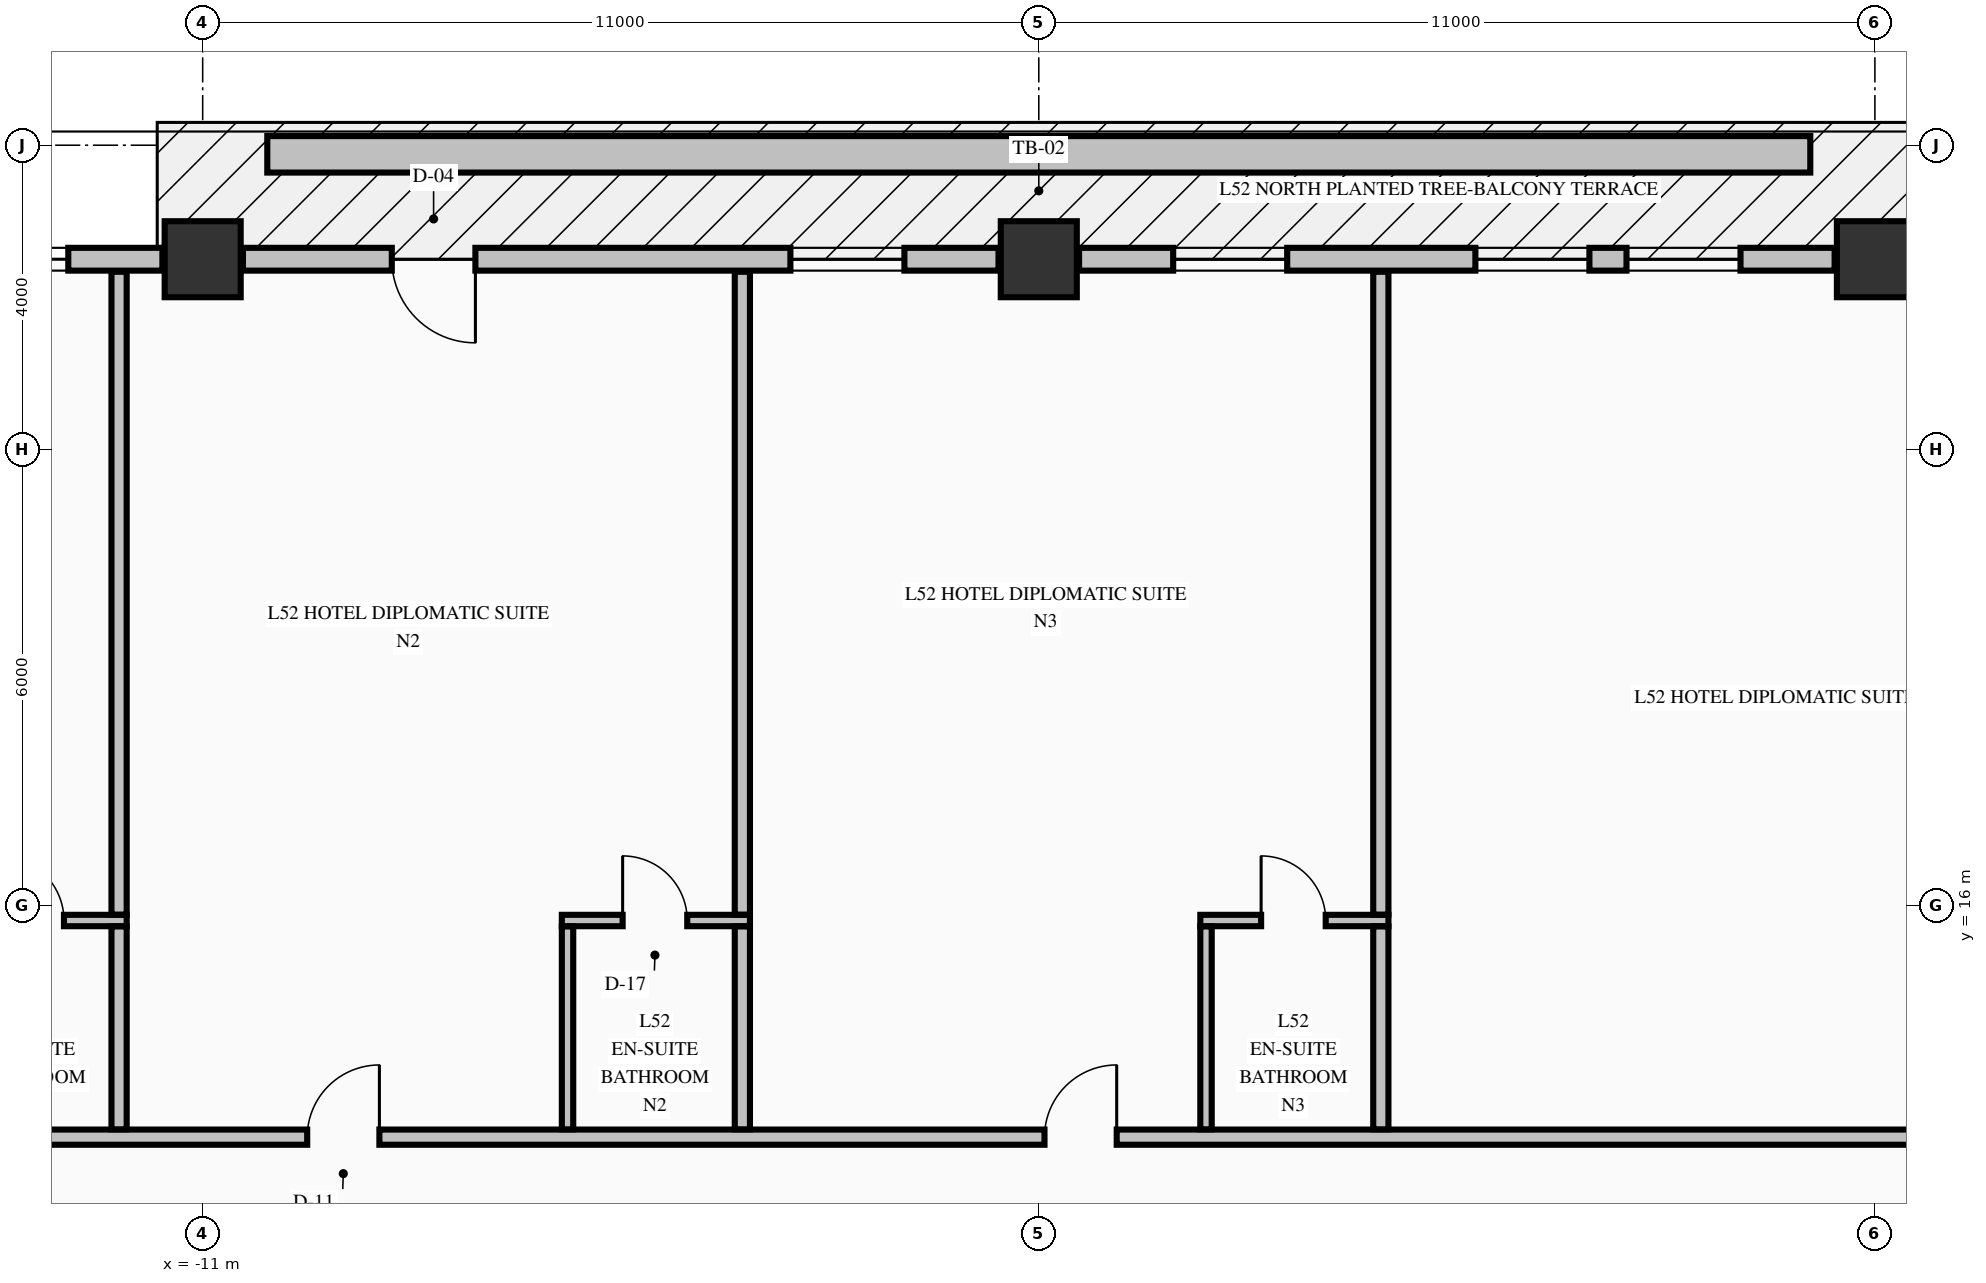
"""IFC4 building model, lengths in metres.
Left out: names, types, materials, properties, quantities, classifications, styles, units other than length and angle.
Written with IfcOpenShell. Run it as: python <this file> out.ifc"""

import sys

from ifc_helpers import new_model, si_unit, direction, frame, frame_2d, origin, origin_2d, place, context, subcontext, project, spatial, rectangle, extrude, element, fill, save


model = new_model("IFC4")
c1 = context("Model", 3, precision=1e-05, world=origin(), true_north=direction((0.0, 1.0)))
c2 = subcontext(c1, "Body", "Model", "MODEL_VIEW")
j1 = project(units=[si_unit("LENGTHUNIT", "METRE"), si_unit("PLANEANGLEUNIT", "RADIAN")], contexts=[c1])
p1 = place(None, origin())
s1 = spatial("IfcSite", under=j1, at=p1, CompositionType="ELEMENT")
p2 = place(p1, origin())
s2 = spatial("IfcBuilding", under=s1, at=p2, CompositionType="ELEMENT")
p3 = place(p2, frame((0.0, 0.0, 201.66)))
s3 = spatial("IfcBuildingStorey", under=s2, at=p3, CompositionType="ELEMENT", Elevation=201.66)
for number, where, z_axis, x_axis in (
    (1, (-11.0, 24.5, -0.25), (0.0, 0.0, 1.0), (1.0, 0.0, 0.0)),
    (2, (0.0, 24.5, -0.25), (0.0, 0.0, 1.0), (1.0, 0.0, 0.0)),
    (3, (11.0, 24.5, -0.25), (0.0, 0.0, 1.0), (1.0, 0.0, 0.0)),
):
    element("IfcColumn", number, at=place(p3, frame(where, z_axis=z_axis, x_axis=x_axis)), inside=s3, PredefinedType="COLUMN", context=c2, shape_type="SweptSolid", body=[
        extrude(rectangle(XDim=1.0, YDim=1.0, at=origin_2d()), origin(), (0.0, 0.0, 1.0), 3.4),
    ])
p4 = place(p3, frame((-11.53, 24.5, 0.0), z_axis=(0.0, 0.0, 1.0), x_axis=(-1.0, 0.0, 0.0)))
e4 = element("IfcWall", 4, at=p4, inside=s3, PredefinedType="STANDARD", context=c2, shape_type="SweptSolid", body=[
    extrude(rectangle(XDim=9.94, YDim=0.3, at=frame_2d((4.97, 0.0))), origin(), (0.0, 0.0, 1.0), 2.542),
])
p5 = place(p4, frame((1.238, 0.0, 0.72)))
e5 = element("IfcOpeningElement", 5, at=p5, cuts=e4, PredefinedType="OPENING", context=c2, shape_type="SweptSolid", body=[
    extrude(rectangle(XDim=1.5, YDim=1.6, at=frame_2d((0.75, 0.8))), frame((0.0, 0.16, 0.0), z_axis=(0.0, -1.0, 0.0), x_axis=(1.0, 0.0, 0.0)), (0.0, 0.0, 1.0), 0.32),
])
p6 = place(p4, frame((3.226, 0.0, 0.72)))
e6 = element("IfcOpeningElement", 6, at=p6, cuts=e4, PredefinedType="OPENING", context=c2, shape_type="SweptSolid", body=[
    extrude(rectangle(XDim=1.5, YDim=1.6, at=frame_2d((0.75, 0.8))), frame((0.0, 0.16, 0.0), z_axis=(0.0, -1.0, 0.0), x_axis=(1.0, 0.0, 0.0)), (0.0, 0.0, 1.0), 0.32),
])
p7 = place(p4, frame((5.214, 0.0, 0.72)))
e7 = element("IfcOpeningElement", 7, at=p7, cuts=e4, PredefinedType="OPENING", context=c2, shape_type="SweptSolid", body=[
    extrude(rectangle(XDim=1.5, YDim=1.6, at=frame_2d((0.75, 0.8))), frame((0.0, 0.16, 0.0), z_axis=(0.0, -1.0, 0.0), x_axis=(1.0, 0.0, 0.0)), (0.0, 0.0, 1.0), 0.32),
])
p8 = place(p3, frame((-0.53, 24.5, 0.0), z_axis=(0.0, 0.0, 1.0), x_axis=(-1.0, 0.0, 0.0)))
e8 = element("IfcWall", 8, at=p8, inside=s3, PredefinedType="STANDARD", context=c2, shape_type="SweptSolid", body=[
    extrude(rectangle(XDim=9.94, YDim=0.3, at=frame_2d((4.97, 0.0))), origin(), (0.0, 0.0, 1.0), 2.542),
])
p9 = place(p8, frame((6.882, 0.0, 0.0)))
e9 = element("IfcOpeningElement", 9, at=p9, cuts=e8, PredefinedType="OPENING", context=c2, shape_type="SweptSolid", body=[
    extrude(rectangle(XDim=1.1, YDim=2.15, at=frame_2d((0.55, 1.075))), frame((0.0, 0.16, 0.0), z_axis=(0.0, -1.0, 0.0), x_axis=(1.0, 0.0, 0.0)), (0.0, 0.0, 1.0), 0.32),
])
p10 = place(p8, frame((1.238, 0.0, 0.72)))
e10 = element("IfcOpeningElement", 10, at=p10, cuts=e8, PredefinedType="OPENING", context=c2, shape_type="SweptSolid", body=[
    extrude(rectangle(XDim=1.5, YDim=1.6, at=frame_2d((0.75, 0.8))), frame((0.0, 0.16, 0.0), z_axis=(0.0, -1.0, 0.0), x_axis=(1.0, 0.0, 0.0)), (0.0, 0.0, 1.0), 0.32),
])
p11 = place(p3, frame((10.47, 24.5, 0.0), z_axis=(0.0, 0.0, 1.0), x_axis=(-1.0, 0.0, 0.0)))
e11 = element("IfcWall", 11, at=p11, inside=s3, PredefinedType="STANDARD", context=c2, shape_type="SweptSolid", body=[
    extrude(rectangle(XDim=9.94, YDim=0.3, at=frame_2d((4.97, 0.0))), origin(), (0.0, 0.0, 1.0), 2.542),
])
p12 = place(p11, frame((1.238, 0.0, 0.72)))
e12 = element("IfcOpeningElement", 12, at=p12, cuts=e11, PredefinedType="OPENING", context=c2, shape_type="SweptSolid", body=[
    extrude(rectangle(XDim=1.5, YDim=1.6, at=frame_2d((0.75, 0.8))), frame((0.0, 0.16, 0.0), z_axis=(0.0, -1.0, 0.0), x_axis=(1.0, 0.0, 0.0)), (0.0, 0.0, 1.0), 0.32),
])
p13 = place(p11, frame((3.226, 0.0, 0.72)))
e13 = element("IfcOpeningElement", 13, at=p13, cuts=e11, PredefinedType="OPENING", context=c2, shape_type="SweptSolid", body=[
    extrude(rectangle(XDim=1.5, YDim=1.6, at=frame_2d((0.75, 0.8))), frame((0.0, 0.16, 0.0), z_axis=(0.0, -1.0, 0.0), x_axis=(1.0, 0.0, 0.0)), (0.0, 0.0, 1.0), 0.32),
])
p14 = place(p11, frame((7.202, 0.0, 0.72)))
e14 = element("IfcOpeningElement", 14, at=p14, cuts=e11, PredefinedType="OPENING", context=c2, shape_type="SweptSolid", body=[
    extrude(rectangle(XDim=1.5, YDim=1.6, at=frame_2d((0.75, 0.8))), frame((0.0, 0.16, 0.0), z_axis=(0.0, -1.0, 0.0), x_axis=(1.0, 0.0, 0.0)), (0.0, 0.0, 1.0), 0.32),
])
p15 = place(p3, frame((-22.1, 12.95, 0.0), z_axis=(0.0, 0.0, 1.0), x_axis=(1.0, 0.0, 0.0)))
e15 = element("IfcWall", 15, at=p15, inside=s3, PredefinedType="PARTITIONING", context=c2, shape_type="SweptSolid", body=[
    extrude(rectangle(XDim=39.2, YDim=0.2, at=frame_2d((19.6, 0.0))), origin(), (0.0, 0.0, 1.0), 3.15),
])
p16 = place(p15, frame((4.525, 0.0, 0.0)))
e16 = element("IfcOpeningElement", 16, at=p16, cuts=e15, PredefinedType="OPENING", context=c2, shape_type="SweptSolid", body=[
    extrude(rectangle(XDim=0.95, YDim=2.15, at=frame_2d((0.475, 1.075))), frame((0.0, 0.11, 0.0), z_axis=(0.0, -1.0, 0.0), x_axis=(1.0, 0.0, 0.0)), (0.0, 0.0, 1.0), 0.22),
])
p17 = place(p15, frame((12.475, 0.0, 0.0)))
e17 = element("IfcOpeningElement", 17, at=p17, cuts=e15, PredefinedType="OPENING", context=c2, shape_type="SweptSolid", body=[
    extrude(rectangle(XDim=0.95, YDim=2.15, at=frame_2d((0.475, 1.075))), frame((0.0, 0.11, 0.0), z_axis=(0.0, -1.0, 0.0), x_axis=(1.0, 0.0, 0.0)), (0.0, 0.0, 1.0), 0.22),
])
p18 = place(p15, frame((22.175, 0.0, 0.0)))
e18 = element("IfcOpeningElement", 18, at=p18, cuts=e15, PredefinedType="OPENING", context=c2, shape_type="SweptSolid", body=[
    extrude(rectangle(XDim=0.95, YDim=2.15, at=frame_2d((0.475, 1.075))), frame((0.0, 0.11, 0.0), z_axis=(0.0, -1.0, 0.0), x_axis=(1.0, 0.0, 0.0)), (0.0, 0.0, 1.0), 0.22),
])
p19 = place(p15, frame((34.675, 0.0, 0.0)))
e19 = element("IfcOpeningElement", 19, at=p19, cuts=e15, PredefinedType="OPENING", context=c2, shape_type="SweptSolid", body=[
    extrude(rectangle(XDim=0.95, YDim=2.15, at=frame_2d((0.475, 1.075))), frame((0.0, 0.11, 0.0), z_axis=(0.0, -1.0, 0.0), x_axis=(1.0, 0.0, 0.0)), (0.0, 0.0, 1.0), 0.22),
])
p20 = place(p3, frame((-14.475, 15.8, 0.0), z_axis=(0.0, 0.0, 1.0), x_axis=(1.0, 0.0, 0.0)))
e20 = element("IfcWall", 20, at=p20, inside=s3, PredefinedType="PARTITIONING", context=c2, shape_type="SweptSolid", body=[
    extrude(rectangle(XDim=2.475, YDim=0.15, at=frame_2d((1.238, 0.0))), origin(), (0.0, 0.0, 1.0), 3.15),
])
p21 = place(p20, frame((0.8, 0.0, 0.0)))
e21 = element("IfcOpeningElement", 21, at=p21, cuts=e20, PredefinedType="OPENING", context=c2, shape_type="SweptSolid", body=[
    extrude(rectangle(XDim=0.85, YDim=2.1, at=frame_2d((0.425, 1.05))), frame((0.0, 0.085, 0.0), z_axis=(0.0, -1.0, 0.0), x_axis=(1.0, 0.0, 0.0)), (0.0, 0.0, 1.0), 0.17),
])
p22 = place(p3, frame((-6.275, 15.8, 0.0), z_axis=(0.0, 0.0, 1.0), x_axis=(1.0, 0.0, 0.0)))
e22 = element("IfcWall", 22, at=p22, inside=s3, PredefinedType="PARTITIONING", context=c2, shape_type="SweptSolid", body=[
    extrude(rectangle(XDim=2.475, YDim=0.15, at=frame_2d((1.237, 0.0))), origin(), (0.0, 0.0, 1.0), 3.15),
])
p23 = place(p22, frame((0.8, 0.0, 0.0)))
e23 = element("IfcOpeningElement", 23, at=p23, cuts=e22, PredefinedType="OPENING", context=c2, shape_type="SweptSolid", body=[
    extrude(rectangle(XDim=0.85, YDim=2.1, at=frame_2d((0.425, 1.05))), frame((0.0, 0.085, 0.0), z_axis=(0.0, -1.0, 0.0), x_axis=(1.0, 0.0, 0.0)), (0.0, 0.0, 1.0), 0.17),
])
p24 = place(p3, frame((2.125, 15.8, 0.0), z_axis=(0.0, 0.0, 1.0), x_axis=(1.0, 0.0, 0.0)))
e24 = element("IfcWall", 24, at=p24, inside=s3, PredefinedType="PARTITIONING", context=c2, shape_type="SweptSolid", body=[
    extrude(rectangle(XDim=2.475, YDim=0.15, at=frame_2d((1.238, 0.0))), origin(), (0.0, 0.0, 1.0), 3.15),
])
p25 = place(p24, frame((0.8, 0.0, 0.0)))
e25 = element("IfcOpeningElement", 25, at=p25, cuts=e24, PredefinedType="OPENING", context=c2, shape_type="SweptSolid", body=[
    extrude(rectangle(XDim=0.85, YDim=2.1, at=frame_2d((0.425, 1.05))), frame((0.0, 0.085, 0.0), z_axis=(0.0, -1.0, 0.0), x_axis=(1.0, 0.0, 0.0)), (0.0, 0.0, 1.0), 0.17),
])
p26 = place(p3, frame((-12.1, 13.053, 0.0), z_axis=(0.0, 0.0, 1.0), x_axis=(0.0, 1.0, 0.0)))
e26 = element("IfcWall", 26, at=p26, inside=s3, PredefinedType="PARTITIONING", context=c2, shape_type="SweptSolid", body=[
    extrude(rectangle(XDim=2.669, YDim=0.2, at=frame_2d((1.334, 0.0))), origin(), (0.0, 0.0, 1.0), 3.15),
])
p27 = place(p3, frame((-12.1, 15.878, 0.0), z_axis=(0.0, 0.0, 1.0), x_axis=(0.0, 1.0, 0.0)))
e27 = element("IfcWall", 27, at=p27, inside=s3, PredefinedType="PARTITIONING", context=c2, shape_type="SweptSolid", body=[
    extrude(rectangle(XDim=8.457, YDim=0.2, at=frame_2d((4.229, 0.0))), origin(), (0.0, 0.0, 1.0), 3.15),
])
p28 = place(p3, frame((-6.2, 13.053, 0.0), z_axis=(0.0, 0.0, 1.0), x_axis=(0.0, 1.0, 0.0)))
e28 = element("IfcWall", 28, at=p28, inside=s3, PredefinedType="PARTITIONING", context=c2, shape_type="SweptSolid", body=[
    extrude(rectangle(XDim=2.669, YDim=0.15, at=frame_2d((1.334, 0.0))), origin(), (0.0, 0.0, 1.0), 3.15),
])
p29 = place(p3, frame((-3.9, 13.053, 0.0), z_axis=(0.0, 0.0, 1.0), x_axis=(0.0, 1.0, 0.0)))
e29 = element("IfcWall", 29, at=p29, inside=s3, PredefinedType="PARTITIONING", context=c2, shape_type="SweptSolid", body=[
    extrude(rectangle(XDim=2.669, YDim=0.2, at=frame_2d((1.334, 0.0))), origin(), (0.0, 0.0, 1.0), 3.15),
])
p30 = place(p3, frame((-3.9, 15.878, 0.0), z_axis=(0.0, 0.0, 1.0), x_axis=(0.0, 1.0, 0.0)))
e30 = element("IfcWall", 30, at=p30, inside=s3, PredefinedType="PARTITIONING", context=c2, shape_type="SweptSolid", body=[
    extrude(rectangle(XDim=8.457, YDim=0.2, at=frame_2d((4.229, 0.0))), origin(), (0.0, 0.0, 1.0), 3.15),
])
p31 = place(p3, frame((2.2, 13.053, 0.0), z_axis=(0.0, 0.0, 1.0), x_axis=(0.0, 1.0, 0.0)))
e31 = element("IfcWall", 31, at=p31, inside=s3, PredefinedType="PARTITIONING", context=c2, shape_type="SweptSolid", body=[
    extrude(rectangle(XDim=2.669, YDim=0.15, at=frame_2d((1.334, 0.0))), origin(), (0.0, 0.0, 1.0), 3.15),
])
p32 = place(p3, frame((4.5, 13.053, 0.0), z_axis=(0.0, 0.0, 1.0), x_axis=(0.0, 1.0, 0.0)))
e32 = element("IfcWall", 32, at=p32, inside=s3, PredefinedType="PARTITIONING", context=c2, shape_type="SweptSolid", body=[
    extrude(rectangle(XDim=2.669, YDim=0.2, at=frame_2d((1.334, 0.0))), origin(), (0.0, 0.0, 1.0), 3.15),
])
p33 = place(p3, frame((4.5, 15.878, 0.0), z_axis=(0.0, 0.0, 1.0), x_axis=(0.0, 1.0, 0.0)))
e33 = element("IfcWall", 33, at=p33, inside=s3, PredefinedType="PARTITIONING", context=c2, shape_type="SweptSolid", body=[
    extrude(rectangle(XDim=8.457, YDim=0.2, at=frame_2d((4.229, 0.0))), origin(), (0.0, 0.0, 1.0), 3.15),
])
p34 = place(p3, frame((-10.15, 25.88, -0.04), z_axis=(0.0, 0.0, 1.0), x_axis=(1.0, 0.0, 0.0)))
e34 = element("IfcWall", 34, at=p34, inside=s3, PredefinedType="PARAPET", context=c2, shape_type="SweptSolid", body=[
    extrude(rectangle(XDim=20.3, YDim=0.48, at=frame_2d((10.15, 0.0))), origin(), (0.0, 0.0, 1.0), 0.52),
])
p35 = place(p5, origin())
e35 = element("IfcWindow", 35, at=p35, inside=s3, PartitioningType="SINGLE_PANEL", PredefinedType="WINDOW", context=c2, shape_type="SweptSolid", body=[
    extrude(rectangle(XDim=1.5, YDim=1.6, at=frame_2d((0.75, 0.8))), frame((0.0, 0.03, 0.0), z_axis=(0.0, -1.0, 0.0), x_axis=(1.0, 0.0, 0.0)), (0.0, 0.0, 1.0), 0.06),
])
fill(e5, e35)
p36 = place(p9, origin())
e36 = element("IfcDoor", 36, at=p36, inside=s3, OperationType="SINGLE_SWING_LEFT", PredefinedType="DOOR", context=c2, shape_type="SweptSolid", body=[
    extrude(rectangle(XDim=1.1, YDim=2.15, at=frame_2d((0.55, 1.075))), frame((0.0, 0.025, 0.0), z_axis=(0.0, -1.0, 0.0), x_axis=(1.0, 0.0, 0.0)), (0.0, 0.0, 1.0), 0.05),
])
fill(e9, e36)
p37 = place(p10, origin())
e37 = element("IfcWindow", 37, at=p37, inside=s3, PartitioningType="SINGLE_PANEL", PredefinedType="WINDOW", context=c2, shape_type="SweptSolid", body=[
    extrude(rectangle(XDim=1.5, YDim=1.6, at=frame_2d((0.75, 0.8))), frame((0.0, 0.03, 0.0), z_axis=(0.0, -1.0, 0.0), x_axis=(1.0, 0.0, 0.0)), (0.0, 0.0, 1.0), 0.06),
])
fill(e10, e37)
p38 = place(p12, origin())
e38 = element("IfcWindow", 38, at=p38, inside=s3, PartitioningType="SINGLE_PANEL", PredefinedType="WINDOW", context=c2, shape_type="SweptSolid", body=[
    extrude(rectangle(XDim=1.5, YDim=1.6, at=frame_2d((0.75, 0.8))), frame((0.0, 0.03, 0.0), z_axis=(0.0, -1.0, 0.0), x_axis=(1.0, 0.0, 0.0)), (0.0, 0.0, 1.0), 0.06),
])
fill(e12, e38)
p39 = place(p13, origin())
e39 = element("IfcWindow", 39, at=p39, inside=s3, PartitioningType="SINGLE_PANEL", PredefinedType="WINDOW", context=c2, shape_type="SweptSolid", body=[
    extrude(rectangle(XDim=1.5, YDim=1.6, at=frame_2d((0.75, 0.8))), frame((0.0, 0.03, 0.0), z_axis=(0.0, -1.0, 0.0), x_axis=(1.0, 0.0, 0.0)), (0.0, 0.0, 1.0), 0.06),
])
fill(e13, e39)
p40 = place(p14, origin())
e40 = element("IfcWindow", 40, at=p40, inside=s3, PartitioningType="SINGLE_PANEL", PredefinedType="WINDOW", context=c2, shape_type="SweptSolid", body=[
    extrude(rectangle(XDim=1.5, YDim=1.6, at=frame_2d((0.75, 0.8))), frame((0.0, 0.03, 0.0), z_axis=(0.0, -1.0, 0.0), x_axis=(1.0, 0.0, 0.0)), (0.0, 0.0, 1.0), 0.06),
])
fill(e14, e40)
p41 = place(p21, origin())
e41 = element("IfcDoor", 41, at=p41, inside=s3, OperationType="SINGLE_SWING_LEFT", PredefinedType="DOOR", context=c2, shape_type="SweptSolid", body=[
    extrude(rectangle(XDim=0.85, YDim=2.1, at=frame_2d((0.425, 1.05))), frame((0.0, 0.025, 0.0), z_axis=(0.0, -1.0, 0.0), x_axis=(1.0, 0.0, 0.0)), (0.0, 0.0, 1.0), 0.05),
])
fill(e21, e41)
p42 = place(p17, origin())
e42 = element("IfcDoor", 42, at=p42, inside=s3, OperationType="SINGLE_SWING_RIGHT", PredefinedType="DOOR", context=c2, shape_type="SweptSolid", body=[
    extrude(rectangle(XDim=0.95, YDim=2.15, at=frame_2d((0.475, 1.075))), frame((0.0, 0.025, 0.0), z_axis=(0.0, -1.0, 0.0), x_axis=(1.0, 0.0, 0.0)), (0.0, 0.0, 1.0), 0.05),
])
fill(e17, e42)
p43 = place(p23, origin())
e43 = element("IfcDoor", 43, at=p43, inside=s3, OperationType="SINGLE_SWING_LEFT", PredefinedType="DOOR", context=c2, shape_type="SweptSolid", body=[
    extrude(rectangle(XDim=0.85, YDim=2.1, at=frame_2d((0.425, 1.05))), frame((0.0, 0.025, 0.0), z_axis=(0.0, -1.0, 0.0), x_axis=(1.0, 0.0, 0.0)), (0.0, 0.0, 1.0), 0.05),
])
fill(e23, e43)
p44 = place(p18, origin())
e44 = element("IfcDoor", 44, at=p44, inside=s3, OperationType="SINGLE_SWING_RIGHT", PredefinedType="DOOR", context=c2, shape_type="SweptSolid", body=[
    extrude(rectangle(XDim=0.95, YDim=2.15, at=frame_2d((0.475, 1.075))), frame((0.0, 0.025, 0.0), z_axis=(0.0, -1.0, 0.0), x_axis=(1.0, 0.0, 0.0)), (0.0, 0.0, 1.0), 0.05),
])
fill(e18, e44)
p45 = place(p25, origin())
e45 = element("IfcDoor", 45, at=p45, inside=s3, OperationType="SINGLE_SWING_LEFT", PredefinedType="DOOR", context=c2, shape_type="SweptSolid", body=[
    extrude(rectangle(XDim=0.85, YDim=2.1, at=frame_2d((0.425, 1.05))), frame((0.0, 0.025, 0.0), z_axis=(0.0, -1.0, 0.0), x_axis=(1.0, 0.0, 0.0)), (0.0, 0.0, 1.0), 0.05),
])
fill(e25, e45)
save(model, sys.argv[1])
